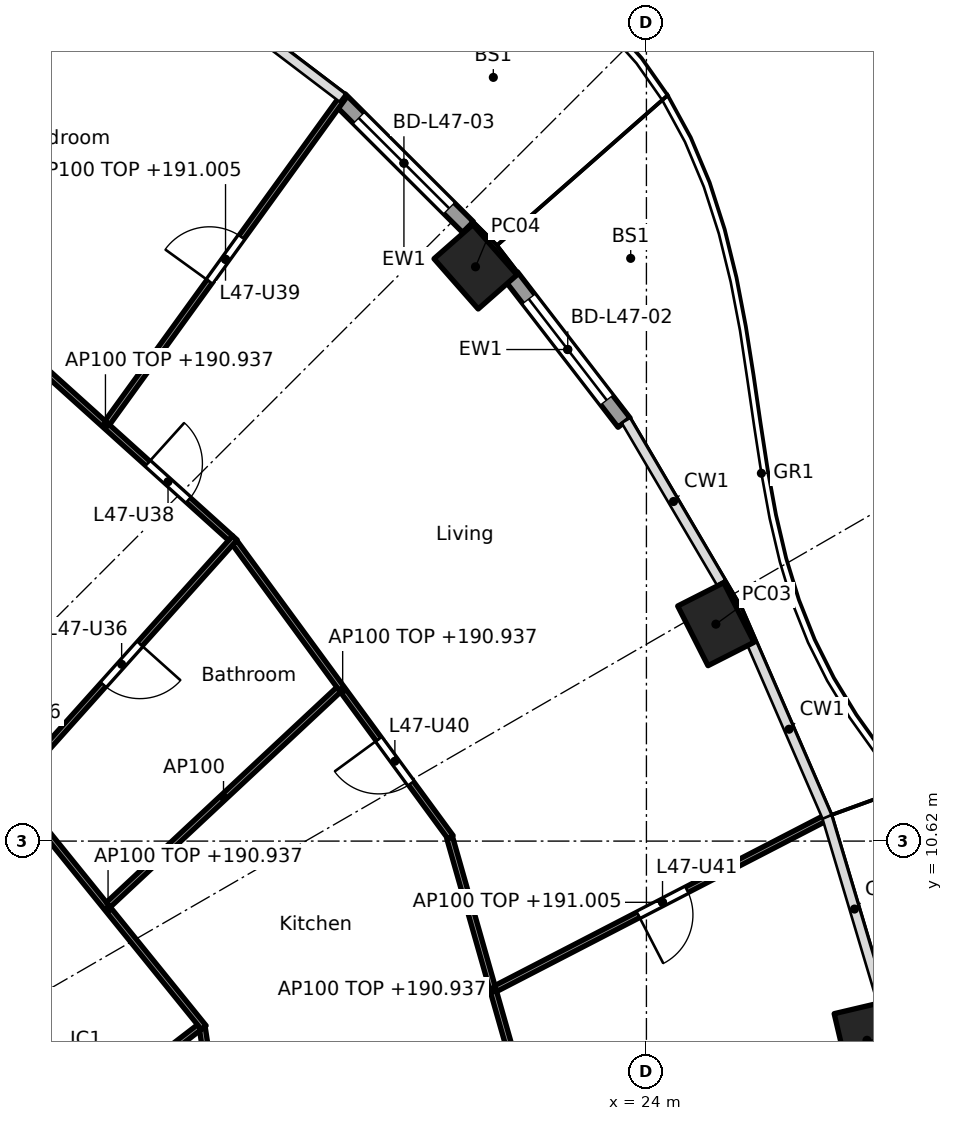
"""IFC4 building model, lengths in metres.
Left out: names, types, materials, properties, quantities, classifications, styles, units other than length and angle.
Written with IfcOpenShell. Run it as: python <this file> out.ifc"""

import sys

from ifc_helpers import new_model, si_unit, direction, frame, frame_2d, origin, origin_2d, place, context, subcontext, project, spatial, rectangle, hollow_rectangle, extrude, element, fill, save


model = new_model("IFC4")
c1 = context("Model", 3, precision=1e-05, world=origin(), true_north=direction((0.0, 1.0)))
c2 = subcontext(c1, "Body", "Model", "MODEL_VIEW")
j1 = project(units=[si_unit("LENGTHUNIT", "METRE"), si_unit("PLANEANGLEUNIT", "RADIAN")], contexts=[c1])
p1 = place(None, origin())
s1 = spatial("IfcSite", under=j1, at=p1, CompositionType="ELEMENT")
p2 = place(p1, origin())
s2 = spatial("IfcBuilding", under=s1, at=p2, CompositionType="ELEMENT")
p3 = place(p2, frame((0.0, 0.0, 188.1)))
s3 = spatial("IfcBuildingStorey", under=s2, at=p3, CompositionType="ELEMENT", Elevation=188.1)
for number, where, z_axis, x_axis in (
    (1, (27.627, 7.344, 0.0), (0.0, 0.0, 1.0), (-0.229, 0.973, 0.0)),
    (2, (25.142, 14.188, 0.0), (0.0, 0.0, 1.0), (-0.452, 0.892, 0.0)),
    (3, (21.189, 20.064, 0.0), (0.0, 0.0, 1.0), (-0.66, 0.751, 0.0)),
):
    element("IfcColumn", number, at=place(p3, frame(where, z_axis=z_axis, x_axis=x_axis)), inside=s3, PredefinedType="COLUMN", context=c2, shape_type="SweptSolid", body=[
        extrude(hollow_rectangle(XDim=1.1, YDim=0.85, WallThickness=0.036, at=origin_2d()), origin(), (0.0, 0.0, 1.0), 3.7),
    ])
p4 = place(p3, frame((21.78, 19.906, 0.0), z_axis=(0.0, 0.0, 1.0), x_axis=(0.610437428894, -0.79206448311, 0.0)))
e4 = element("IfcWall", 4, at=p4, inside=s3, PredefinedType="SOLIDWALL", context=c2, shape_type="SweptSolid", body=[
    extrude(rectangle(XDim=3.035, YDim=0.25, at=frame_2d((1.518, 0.0))), origin(), (0.0, 0.0, 1.0), 3.44),
])
p5 = place(p4, frame((0.468, 0.0, 0.0)))
e5 = element("IfcOpeningElement", 5, at=p5, cuts=e4, PredefinedType="OPENING", context=c2, shape_type="SweptSolid", body=[
    extrude(rectangle(XDim=2.1, YDim=2.4, at=frame_2d((1.05, 1.2))), frame((0.0, 0.135, 0.0), z_axis=(0.0, -1.0, 0.0), x_axis=(1.0, 0.0, 0.0)), (0.0, 0.0, 1.0), 0.27),
])
p6 = place(p3, frame((18.959, 22.82, 0.0), z_axis=(0.0, 0.0, 1.0), x_axis=(0.707844845069, -0.706367946122, 0.0)))
e6 = element("IfcWall", 6, at=p6, inside=s3, PredefinedType="SOLIDWALL", context=c2, shape_type="SweptSolid", body=[
    extrude(rectangle(XDim=2.976, YDim=0.25, at=frame_2d((1.488, 0.0))), origin(), (0.0, 0.0, 1.0), 3.44),
])
p7 = place(p6, frame((0.438, 0.0, 0.0)))
e7 = element("IfcOpeningElement", 7, at=p7, cuts=e6, PredefinedType="OPENING", context=c2, shape_type="SweptSolid", body=[
    extrude(rectangle(XDim=2.1, YDim=2.4, at=frame_2d((1.05, 1.2))), frame((0.0, 0.135, 0.0), z_axis=(0.0, -1.0, 0.0), x_axis=(1.0, 0.0, 0.0)), (0.0, 0.0, 1.0), 0.27),
])
p8 = place(p3, frame((17.221, 4.113, 0.0), z_axis=(0.0, 0.0, 1.0), x_axis=(-0.151078880423, 0.988521710379, 0.0)))
e8 = element("IfcWall", 8, at=p8, inside=s3, PredefinedType="PARTITIONING", context=c2, shape_type="SweptSolid", body=[
    extrude(rectangle(XDim=3.469, YDim=0.1, at=frame_2d((1.735, 0.0))), origin(), (0.0, 0.0, 1.0), 2.837),
])
p9 = place(p8, frame((0.18, 0.0, 0.0)))
e9 = element("IfcOpeningElement", 9, at=p9, cuts=e8, PredefinedType="OPENING", context=c2, shape_type="SweptSolid", body=[
    extrude(rectangle(XDim=0.9, YDim=2.1, at=frame_2d((0.45, 1.05))), frame((0.0, 0.06, 0.0), z_axis=(0.0, -1.0, 0.0), x_axis=(1.0, 0.0, 0.0)), (0.0, 0.0, 1.0), 0.12),
])
p10 = place(p3, frame((22.189, 5.67, 0.0), z_axis=(0.0, 0.0, 1.0), x_axis=(-0.273815967041, 0.961782104322, 0.0)))
e10 = element("IfcWall", 10, at=p10, inside=s3, PredefinedType="PARTITIONING", context=c2, shape_type="SweptSolid", body=[
    extrude(rectangle(XDim=5.202, YDim=0.1, at=frame_2d((2.601, 0.0))), origin(), (0.0, 0.0, 1.0), 2.837),
])
p11 = place(p3, frame((21.522, 8.195, 0.0), z_axis=(0.0, 0.0, 1.0), x_axis=(0.888281046031, 0.459300319249, 0.0)))
e11 = element("IfcWall", 11, at=p11, inside=s3, PredefinedType="PARTITIONING", context=c2, shape_type="SweptSolid", body=[
    extrude(rectangle(XDim=6.176, YDim=0.1, at=frame_2d((3.088, 0.0))), origin(), (0.0, 0.0, 1.0), 2.905),
])
p12 = place(p11, frame((2.638, 0.0, 0.0)))
e12 = element("IfcOpeningElement", 12, at=p12, cuts=e11, PredefinedType="OPENING", context=c2, shape_type="SweptSolid", body=[
    extrude(rectangle(XDim=0.9, YDim=2.1, at=frame_2d((0.45, 1.05))), frame((0.0, 0.06, 0.0), z_axis=(0.0, -1.0, 0.0), x_axis=(1.0, 0.0, 0.0)), (0.0, 0.0, 1.0), 0.12),
])
p13 = place(p3, frame((14.822, 6.154, 0.0), z_axis=(0.0, 0.0, 1.0), x_axis=(0.792226528082, 0.610227111987, 0.0)))
e13 = element("IfcWall", 13, at=p13, inside=s3, PredefinedType="PARTITIONING", context=c2, shape_type="SweptSolid", body=[
    extrude(rectangle(XDim=2.307, YDim=0.1, at=frame_2d((1.154, 0.0))), origin(), (0.0, 0.0, 1.0), 3.44),
])
p14 = place(p3, frame((16.721, 7.553, 0.0), z_axis=(0.0, 0.0, 1.0), x_axis=(-0.628753513808, 0.777604667472, 0.0)))
e14 = element("IfcWall", 14, at=p14, inside=s3, PredefinedType="PARTITIONING", context=c2, shape_type="SweptSolid", body=[
    extrude(rectangle(XDim=5.007, YDim=0.1, at=frame_2d((2.504, 0.0))), origin(), (0.0, 0.0, 1.0), 2.837),
])
p15 = place(p3, frame((20.781, 10.681, 0.0), z_axis=(0.0, 0.0, 1.0), x_axis=(-0.591117075283, 0.806585769345, 0.0)))
e15 = element("IfcWall", 15, at=p15, inside=s3, PredefinedType="PARTITIONING", context=c2, shape_type="SweptSolid", body=[
    extrude(rectangle(XDim=6.01, YDim=0.1, at=frame_2d((3.005, 0.0))), origin(), (0.0, 0.0, 1.0), 2.837),
])
p16 = place(p15, frame((1.103, 0.0, 0.0)))
e16 = element("IfcOpeningElement", 16, at=p16, cuts=e15, PredefinedType="OPENING", context=c2, shape_type="SweptSolid", body=[
    extrude(rectangle(XDim=0.9, YDim=2.1, at=frame_2d((0.45, 1.05))), frame((0.0, 0.06, 0.0), z_axis=(0.0, -1.0, 0.0), x_axis=(1.0, 0.0, 0.0)), (0.0, 0.0, 1.0), 0.12),
])
p17 = place(p3, frame((15.152, 9.573, 0.0), z_axis=(0.0, 0.0, 1.0), x_axis=(0.730723083214, 0.682673989294, 0.0)))
e17 = element("IfcWall", 17, at=p17, inside=s3, PredefinedType="PARTITIONING", context=c2, shape_type="SweptSolid", body=[
    extrude(rectangle(XDim=5.183, YDim=0.1, at=frame_2d((2.591, 0.0))), origin(), (0.0, 0.0, 1.0), 3.44),
])
p18 = place(p3, frame((10.178, 7.732, 0.0), z_axis=(0.0, 0.0, 1.0), x_axis=(0.667280084362, 0.744806880348, 0.0)))
e18 = element("IfcWall", 18, at=p18, inside=s3, PredefinedType="PARTITIONING", context=c2, shape_type="SweptSolid", body=[
    extrude(rectangle(XDim=10.572, YDim=0.1, at=frame_2d((5.286, 0.0))), origin(), (0.0, 0.0, 1.0), 2.756),
])
p19 = place(p18, frame((2.07, 0.0, 0.0)))
e19 = element("IfcOpeningElement", 19, at=p19, cuts=e18, PredefinedType="OPENING", context=c2, shape_type="SweptSolid", body=[
    extrude(rectangle(XDim=0.9, YDim=2.1, at=frame_2d((0.45, 1.05))), frame((0.0, 0.06, 0.0), z_axis=(0.0, -1.0, 0.0), x_axis=(1.0, 0.0, 0.0)), (0.0, 0.0, 1.0), 0.12),
])
p20 = place(p18, frame((7.331, 0.0, 0.0)))
e20 = element("IfcOpeningElement", 20, at=p20, cuts=e18, PredefinedType="OPENING", context=c2, shape_type="SweptSolid", body=[
    extrude(rectangle(XDim=0.9, YDim=2.1, at=frame_2d((0.45, 1.05))), frame((0.0, 0.06, 0.0), z_axis=(0.0, -1.0, 0.0), x_axis=(1.0, 0.0, 0.0)), (0.0, 0.0, 1.0), 0.12),
])
p21 = place(p3, frame((17.162, 15.603, 0.0), z_axis=(0.0, 0.0, 1.0), x_axis=(-0.742790086539, 0.66952437397, 0.0)))
e21 = element("IfcWall", 21, at=p21, inside=s3, PredefinedType="PARTITIONING", context=c2, shape_type="SweptSolid", body=[
    extrude(rectangle(XDim=5.542, YDim=0.1, at=frame_2d((2.771, 0.0))), origin(), (0.0, 0.0, 1.0), 2.837),
])
p22 = place(p21, frame((0.935, 0.0, 0.0)))
e22 = element("IfcOpeningElement", 22, at=p22, cuts=e21, PredefinedType="OPENING", context=c2, shape_type="SweptSolid", body=[
    extrude(rectangle(XDim=0.9, YDim=2.1, at=frame_2d((0.45, 1.05))), frame((0.0, 0.06, 0.0), z_axis=(0.0, -1.0, 0.0), x_axis=(1.0, 0.0, 0.0)), (0.0, 0.0, 1.0), 0.12),
])
p23 = place(p3, frame((15.133, 17.498, 0.0), z_axis=(0.0, 0.0, 1.0), x_axis=(0.586223556927, 0.810149332718, 0.0)))
e23 = element("IfcWall", 23, at=p23, inside=s3, PredefinedType="PARTITIONING", context=c2, shape_type="SweptSolid", body=[
    extrude(rectangle(XDim=6.638, YDim=0.1, at=frame_2d((3.319, 0.0))), origin(), (0.0, 0.0, 1.0), 2.905),
])
p24 = place(p23, frame((2.869, 0.0, 0.0)))
e24 = element("IfcOpeningElement", 24, at=p24, cuts=e23, PredefinedType="OPENING", context=c2, shape_type="SweptSolid", body=[
    extrude(rectangle(XDim=0.9, YDim=2.1, at=frame_2d((0.45, 1.05))), frame((0.0, 0.06, 0.0), z_axis=(0.0, -1.0, 0.0), x_axis=(1.0, 0.0, 0.0)), (0.0, 0.0, 1.0), 0.12),
])
p25 = place(p5, origin())
e25 = element("IfcDoor", 25, at=p25, inside=s3, OperationType="SLIDING_TO_LEFT", PredefinedType="DOOR", context=c2, shape_type="SweptSolid", body=[
    extrude(rectangle(XDim=2.1, YDim=2.4, at=frame_2d((1.05, 1.2))), frame((0.0, 0.025, 0.0), z_axis=(0.0, -1.0, 0.0), x_axis=(1.0, 0.0, 0.0)), (0.0, 0.0, 1.0), 0.05),
])
fill(e5, e25)
p26 = place(p7, origin())
e26 = element("IfcDoor", 26, at=p26, inside=s3, OperationType="SLIDING_TO_LEFT", PredefinedType="DOOR", context=c2, shape_type="SweptSolid", body=[
    extrude(rectangle(XDim=2.1, YDim=2.4, at=frame_2d((1.05, 1.2))), frame((0.0, 0.025, 0.0), z_axis=(0.0, -1.0, 0.0), x_axis=(1.0, 0.0, 0.0)), (0.0, 0.0, 1.0), 0.05),
])
fill(e7, e26)
p27 = place(p20, frame((0.9, 0.0, 0.0), x_axis=(-1.0, 0.0, 0.0)))
e27 = element("IfcDoor", 27, at=p27, inside=s3, OperationType="SINGLE_SWING_LEFT", PredefinedType="DOOR", context=c2, shape_type="SweptSolid", body=[
    extrude(rectangle(XDim=0.9, YDim=2.1, at=frame_2d((0.45, 1.05))), frame((0.0, 0.025, 0.0), z_axis=(0.0, -1.0, 0.0), x_axis=(1.0, 0.0, 0.0)), (0.0, 0.0, 1.0), 0.05),
])
fill(e20, e27)
p28 = place(p22, frame((0.9, 0.0, 0.0), x_axis=(-1.0, 0.0, 0.0)))
e28 = element("IfcDoor", 28, at=p28, inside=s3, OperationType="SINGLE_SWING_LEFT", PredefinedType="DOOR", context=c2, shape_type="SweptSolid", body=[
    extrude(rectangle(XDim=0.9, YDim=2.1, at=frame_2d((0.45, 1.05))), frame((0.0, 0.025, 0.0), z_axis=(0.0, -1.0, 0.0), x_axis=(1.0, 0.0, 0.0)), (0.0, 0.0, 1.0), 0.05),
])
fill(e22, e28)
p29 = place(p24, origin())
e29 = element("IfcDoor", 29, at=p29, inside=s3, OperationType="SINGLE_SWING_LEFT", PredefinedType="DOOR", context=c2, shape_type="SweptSolid", body=[
    extrude(rectangle(XDim=0.9, YDim=2.1, at=frame_2d((0.45, 1.05))), frame((0.0, 0.025, 0.0), z_axis=(0.0, -1.0, 0.0), x_axis=(1.0, 0.0, 0.0)), (0.0, 0.0, 1.0), 0.05),
])
fill(e24, e29)
p30 = place(p16, origin())
e30 = element("IfcDoor", 30, at=p30, inside=s3, OperationType="SINGLE_SWING_RIGHT", PredefinedType="DOOR", context=c2, shape_type="SweptSolid", body=[
    extrude(rectangle(XDim=0.9, YDim=2.1, at=frame_2d((0.45, 1.05))), frame((0.0, 0.025, 0.0), z_axis=(0.0, -1.0, 0.0), x_axis=(1.0, 0.0, 0.0)), (0.0, 0.0, 1.0), 0.05),
])
fill(e16, e30)
p31 = place(p12, frame((0.9, 0.0, 0.0), x_axis=(-1.0, 0.0, 0.0)))
e31 = element("IfcDoor", 31, at=p31, inside=s3, OperationType="SINGLE_SWING_RIGHT", PredefinedType="DOOR", context=c2, shape_type="SweptSolid", body=[
    extrude(rectangle(XDim=0.9, YDim=2.1, at=frame_2d((0.45, 1.05))), frame((0.0, 0.025, 0.0), z_axis=(0.0, -1.0, 0.0), x_axis=(1.0, 0.0, 0.0)), (0.0, 0.0, 1.0), 0.05),
])
fill(e12, e31)
save(model, sys.argv[1])
